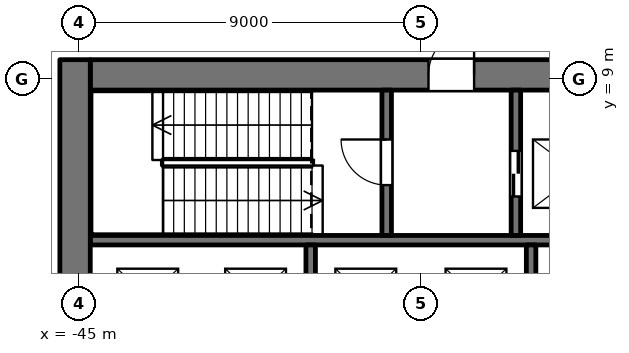
"""IFC4 building model, lengths in metres.
Left out: names, types, materials, properties, quantities, classifications, styles, units other than length and angle.
Written with IfcOpenShell. Run it as: python <this file> out.ifc"""

import sys

from ifc_helpers import new_model, si_unit, direction, frame, frame_2d, origin, place, context, subcontext, project, spatial, rectangle, extrude, element, fill, save


model = new_model("IFC4")
c1 = context("Model", 3, precision=1e-05, world=origin(), true_north=direction((0.0, 1.0)))
c2 = subcontext(c1, "Body", "Model", "MODEL_VIEW")
j1 = project(units=[si_unit("LENGTHUNIT", "METRE"), si_unit("PLANEANGLEUNIT", "RADIAN")], contexts=[c1])
p1 = place(None, origin())
s1 = spatial("IfcSite", under=j1, at=p1, CompositionType="ELEMENT")
p2 = place(p1, origin())
s2 = spatial("IfcBuilding", under=s1, at=p2, CompositionType="ELEMENT")
p3 = place(p2, frame((0.0, 0.0, 12.6)))
s3 = spatial("IfcBuildingStorey", under=s2, at=p3, CompositionType="ELEMENT", Elevation=12.6)
p4 = place(p3, frame((-44.7, 4.75, 0.0), z_axis=(0.0, 0.0, 1.0), x_axis=(1.0, 0.0, 0.0)))
e1 = element("IfcWall", 1, at=p4, inside=s3, PredefinedType="SHEAR", context=c2, shape_type="SweptSolid", body=[
    extrude(rectangle(XDim=17.4, YDim=0.25, at=frame_2d((8.7, 0.0))), origin(), (0.0, 0.0, 1.0), 5.1),
])
p5 = place(p3, frame((-44.7, 9.1, 0.0), z_axis=(0.0, 0.0, 1.0), x_axis=(1.0, 0.0, 0.0)))
e2 = element("IfcWall", 2, at=p5, inside=s3, PredefinedType="SHEAR", context=c2, shape_type="SweptSolid", body=[
    extrude(rectangle(XDim=17.4, YDim=0.8, at=frame_2d((8.7, 0.0))), origin(), (0.0, 0.0, 1.0), 5.1),
])
p6 = place(p5, frame((8.9, 0.0, 0.0)))
e3 = element("IfcOpeningElement", 3, at=p6, cuts=e2, PredefinedType="OPENING", context=c2, shape_type="SweptSolid", body=[
    extrude(rectangle(XDim=1.2, YDim=2.1, at=frame_2d((0.6, 1.05))), frame((0.0, 0.41, 0.0), z_axis=(0.0, -1.0, 0.0), x_axis=(1.0, 0.0, 0.0)), (0.0, 0.0, 1.0), 0.82),
])
p7 = place(p5, frame((14.8, 0.0, 0.0)))
e4 = element("IfcOpeningElement", 4, at=p7, cuts=e2, PredefinedType="OPENING", context=c2, shape_type="SweptSolid", body=[
    extrude(rectangle(XDim=0.9, YDim=2.1, at=frame_2d((0.45, 1.05))), frame((0.0, 0.41, 0.0), z_axis=(0.0, -1.0, 0.0), x_axis=(1.0, 0.0, 0.0)), (0.0, 0.0, 1.0), 0.82),
])
p8 = place(p5, frame((16.3, 0.0, 0.0)))
e5 = element("IfcOpeningElement", 5, at=p8, cuts=e2, PredefinedType="OPENING", context=c2, shape_type="SweptSolid", body=[
    extrude(rectangle(XDim=0.9, YDim=2.1, at=frame_2d((0.45, 1.05))), frame((0.0, 0.41, 0.0), z_axis=(0.0, -1.0, 0.0), x_axis=(1.0, 0.0, 0.0)), (0.0, 0.0, 1.0), 0.82),
])
p9 = place(p3, frame((-45.1, -9.5, 0.0), z_axis=(0.0, 0.0, 1.0), x_axis=(0.0, 1.0, 0.0)))
e6 = element("IfcWall", 6, at=p9, inside=s3, PredefinedType="SHEAR", context=c2, shape_type="SweptSolid", body=[
    extrude(rectangle(XDim=19.0, YDim=0.8, at=frame_2d((9.5, 0.0))), origin(), (0.0, 0.0, 1.0), 5.1),
])
p10 = place(p9, frame((8.3, 0.0, 0.0)))
e7 = element("IfcOpeningElement", 7, at=p10, cuts=e6, PredefinedType="OPENING", context=c2, shape_type="SweptSolid", body=[
    extrude(rectangle(XDim=2.4, YDim=2.1, at=frame_2d((1.2, 1.05))), frame((0.0, 0.41, 0.0), z_axis=(0.0, -1.0, 0.0), x_axis=(1.0, 0.0, 0.0)), (0.0, 0.0, 1.0), 0.82),
])
p11 = place(p3, frame((-38.9, 2.0, 0.0), z_axis=(0.0, 0.0, 1.0), x_axis=(0.0, 1.0, 0.0)))
e8 = element("IfcWall", 8, at=p11, inside=s3, PredefinedType="SHEAR", context=c2, shape_type="SweptSolid", body=[
    extrude(rectangle(XDim=2.625, YDim=0.25, at=frame_2d((1.312, 0.0))), origin(), (0.0, 0.0, 1.0), 5.1),
])
p12 = place(p3, frame((-36.9, 4.875, 0.0), z_axis=(0.0, 0.0, 1.0), x_axis=(0.0, 1.0, 0.0)))
e9 = element("IfcWall", 9, at=p12, inside=s3, PredefinedType="SHEAR", context=c2, shape_type="SweptSolid", body=[
    extrude(rectangle(XDim=3.825, YDim=0.25, at=frame_2d((1.913, 0.0))), origin(), (0.0, 0.0, 1.0), 5.1),
])
p13 = place(p12, frame((1.325, 0.0, 0.0)))
e10 = element("IfcOpeningElement", 10, at=p13, cuts=e9, PredefinedType="OPENING", context=c2, shape_type="SweptSolid", body=[
    extrude(rectangle(XDim=1.2, YDim=2.1, at=frame_2d((0.6, 1.05))), frame((0.0, 0.135, 0.0), z_axis=(0.0, -1.0, 0.0), x_axis=(1.0, 0.0, 0.0)), (0.0, 0.0, 1.0), 0.27),
])
p14 = place(p3, frame((-33.5, 4.875, 0.0), z_axis=(0.0, 0.0, 1.0), x_axis=(0.0, 1.0, 0.0)))
e11 = element("IfcWall", 11, at=p14, inside=s3, PredefinedType="SHEAR", context=c2, shape_type="SweptSolid", body=[
    extrude(rectangle(XDim=3.825, YDim=0.25, at=frame_2d((1.913, 0.0))), origin(), (0.0, 0.0, 1.0), 5.1),
])
p15 = place(p14, frame((1.025, 0.0, 0.0)))
e12 = element("IfcOpeningElement", 12, at=p15, cuts=e11, PredefinedType="OPENING", context=c2, shape_type="SweptSolid", body=[
    extrude(rectangle(XDim=1.2, YDim=2.1, at=frame_2d((0.6, 1.05))), frame((0.0, 0.135, 0.0), z_axis=(0.0, -1.0, 0.0), x_axis=(1.0, 0.0, 0.0)), (0.0, 0.0, 1.0), 0.27),
])
p16 = place(p3, frame((-33.1, 2.0, 0.0), z_axis=(0.0, 0.0, 1.0), x_axis=(0.0, 1.0, 0.0)))
e13 = element("IfcWall", 13, at=p16, inside=s3, PredefinedType="SHEAR", context=c2, shape_type="SweptSolid", body=[
    extrude(rectangle(XDim=2.625, YDim=0.25, at=frame_2d((1.312, 0.0))), origin(), (0.0, 0.0, 1.0), 5.1),
])
p17 = place(p15, origin())
e14 = element("IfcDoor", 14, at=p17, inside=s3, OperationType="SLIDING_TO_LEFT", PredefinedType="DOOR", context=c2, shape_type="SweptSolid", body=[
    extrude(rectangle(XDim=1.2, YDim=2.1, at=frame_2d((0.6, 1.05))), frame((0.0, 0.025, 0.0), z_axis=(0.0, -1.0, 0.0), x_axis=(1.0, 0.0, 0.0)), (0.0, 0.0, 1.0), 0.05),
])
fill(e12, e14)
p18 = place(p13, origin())
e15 = element("IfcDoor", 15, at=p18, inside=s3, OperationType="SINGLE_SWING_RIGHT", PredefinedType="DOOR", context=c2, shape_type="SweptSolid", body=[
    extrude(rectangle(XDim=1.2, YDim=2.1, at=frame_2d((0.6, 1.05))), frame((0.0, 0.025, 0.0), z_axis=(0.0, -1.0, 0.0), x_axis=(1.0, 0.0, 0.0)), (0.0, 0.0, 1.0), 0.05),
])
fill(e10, e15)
p19 = place(p6, origin())
e16 = element("IfcDoor", 16, at=p19, inside=s3, OperationType="SINGLE_SWING_RIGHT", PredefinedType="DOOR", context=c2, shape_type="SweptSolid", body=[
    extrude(rectangle(XDim=1.2, YDim=2.1, at=frame_2d((0.6, 1.05))), frame((0.0, -0.225, 0.0), z_axis=(0.0, -1.0, 0.0), x_axis=(1.0, 0.0, 0.0)), (0.0, 0.0, 1.0), 0.05),
])
fill(e3, e16)
save(model, sys.argv[1])
